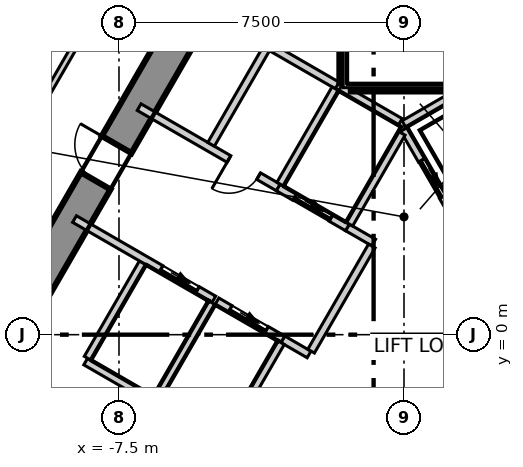
"""IFC4 building model, lengths in metres.
Left out: names, types, materials, properties, quantities, classifications, styles, units other than length and angle.
Written with IfcOpenShell. Run it as: python <this file> out.ifc"""

import sys

from ifc_helpers import new_model, si_unit, direction, frame, frame_2d, origin, place, context, subcontext, project, spatial, polyline, rectangle, outline, extrude, element, fill, save


model = new_model("IFC4")
c1 = context("Model", 3, precision=1e-05, world=origin(), true_north=direction((0.0, 1.0)))
c2 = subcontext(c1, "Body", "Model", "MODEL_VIEW")
j1 = project(units=[si_unit("LENGTHUNIT", "METRE"), si_unit("PLANEANGLEUNIT", "RADIAN")], contexts=[c1])
p1 = place(None, origin())
s1 = spatial("IfcSite", under=j1, at=p1, CompositionType="ELEMENT")
p2 = place(p1, origin())
s2 = spatial("IfcBuilding", under=s1, at=p2, CompositionType="ELEMENT")
p3 = place(p2, frame((0.0, 0.0, 59.3)))
s3 = spatial("IfcBuildingStorey", under=s2, at=p3, CompositionType="ELEMENT", Elevation=59.3)
p4 = place(p3, frame((-1.645, 15.25, -0.3), z_axis=(0.0, 0.0, 1.0), x_axis=(-0.500026485275, -0.866010111964, 0.0)))
e1 = element("IfcWall", 1, at=p4, inside=s3, PredefinedType="SHEAR", context=c2, shape_type="SweptSolid", body=[
    extrude(outline(polyline([(-0.26, -0.45), (1.685, -0.45), (3.63, -0.45), (5.576, -0.45), (7.521, -0.45), (9.466, -0.449), (11.411, -0.449), (13.357, -0.449), (15.302, -0.449), (17.247, -0.449), (19.192, -0.449), (21.138, -0.449), (23.083, -0.449), (25.028, -0.449), (24.509, 0.45), (22.644, 0.45), (20.778, 0.45), (18.913, 0.45), (17.048, 0.45), (15.182, 0.449), (13.317, 0.449), (11.452, 0.449), (9.587, 0.449), (7.721, 0.449), (5.856, 0.449), (3.991, 0.449), (2.125, 0.449), (0.26, 0.449), (-0.26, -0.45)])), origin(), (0.0, 0.0, 1.0), 4.0),
])
p5 = place(p4, frame((11.834, 0.0, 0.3)))
e2 = element("IfcOpeningElement", 2, at=p5, cuts=e1, PredefinedType="OPENING", context=c2, shape_type="SweptSolid", body=[
    extrude(rectangle(XDim=1.1, YDim=2.1, at=frame_2d((0.55, 1.05))), frame((0.0, 0.46, 0.0), z_axis=(0.0, -1.0, 0.0), x_axis=(1.0, 0.0, 0.0)), (0.0, 0.0, 1.0), 0.92),
])
p6 = place(p4, frame((18.976, 0.0, 0.3)))
e3 = element("IfcOpeningElement", 3, at=p6, cuts=e1, PredefinedType="OPENING", context=c2, shape_type="SweptSolid", body=[
    extrude(rectangle(XDim=0.9, YDim=2.1, at=frame_2d((0.45, 1.05))), frame((0.0, 0.46, 0.0), z_axis=(0.0, -1.0, 0.0), x_axis=(1.0, 0.0, 0.0)), (0.0, 0.0, 1.0), 0.92),
])
p7 = place(p4, frame((4.892, 0.0, 0.3)))
e4 = element("IfcOpeningElement", 4, at=p7, cuts=e1, PredefinedType="OPENING", context=c2, shape_type="SweptSolid", body=[
    extrude(rectangle(XDim=0.9, YDim=2.1, at=frame_2d((0.45, 1.05))), frame((0.0, 0.46, 0.0), z_axis=(0.0, -1.0, 0.0), x_axis=(1.0, 0.0, 0.0)), (0.0, 0.0, 1.0), 0.92),
])
p8 = place(p3, frame((-3.371, 37.591, 0.0), z_axis=(0.0, 0.0, 1.0), x_axis=(-0.500006313899, -0.866021758423, 0.0)))
e5 = element("IfcWall", 5, at=p8, inside=s3, PredefinedType="ELEMENTEDWALL", context=c2, shape_type="SweptSolid", body=[
    extrude(rectangle(XDim=61.719, YDim=0.2, at=frame_2d((30.859, 0.0))), origin(), (0.0, 0.0, 1.0), 3.7),
])
p9 = place(p8, frame((2.198, 0.0, 0.9)))
e6 = element("IfcOpeningElement", 6, at=p9, cuts=e5, PredefinedType="OPENING", context=c2, shape_type="SweptSolid", body=[
    extrude(rectangle(XDim=5.6, YDim=2.5, at=frame_2d((2.8, 1.25))), frame((0.0, 0.11, 0.0), z_axis=(0.0, -1.0, 0.0), x_axis=(1.0, 0.0, 0.0)), (0.0, 0.0, 1.0), 0.22),
])
p10 = place(p8, frame((9.59, 0.0, 0.9)))
e7 = element("IfcOpeningElement", 7, at=p10, cuts=e5, PredefinedType="OPENING", context=c2, shape_type="SweptSolid", body=[
    extrude(rectangle(XDim=5.6, YDim=2.5, at=frame_2d((2.8, 1.25))), frame((0.0, 0.11, 0.0), z_axis=(0.0, -1.0, 0.0), x_axis=(1.0, 0.0, 0.0)), (0.0, 0.0, 1.0), 0.22),
])
p11 = place(p8, frame((16.982, 0.0, 0.9)))
e8 = element("IfcOpeningElement", 8, at=p11, cuts=e5, PredefinedType="OPENING", context=c2, shape_type="SweptSolid", body=[
    extrude(rectangle(XDim=5.6, YDim=2.5, at=frame_2d((2.8, 1.25))), frame((0.0, 0.11, 0.0), z_axis=(0.0, -1.0, 0.0), x_axis=(1.0, 0.0, 0.0)), (0.0, 0.0, 1.0), 0.22),
])
p12 = place(p8, frame((24.373, 0.0, 0.9)))
e9 = element("IfcOpeningElement", 9, at=p12, cuts=e5, PredefinedType="OPENING", context=c2, shape_type="SweptSolid", body=[
    extrude(rectangle(XDim=5.6, YDim=2.5, at=frame_2d((2.8, 1.25))), frame((0.0, 0.11, 0.0), z_axis=(0.0, -1.0, 0.0), x_axis=(1.0, 0.0, 0.0)), (0.0, 0.0, 1.0), 0.22),
])
p13 = place(p8, frame((31.765, 0.0, 0.9)))
e10 = element("IfcOpeningElement", 10, at=p13, cuts=e5, PredefinedType="OPENING", context=c2, shape_type="SweptSolid", body=[
    extrude(rectangle(XDim=5.6, YDim=2.5, at=frame_2d((2.8, 1.25))), frame((0.0, 0.11, 0.0), z_axis=(0.0, -1.0, 0.0), x_axis=(1.0, 0.0, 0.0)), (0.0, 0.0, 1.0), 0.22),
])
p14 = place(p8, frame((39.157, 0.0, 0.9)))
e11 = element("IfcOpeningElement", 11, at=p14, cuts=e5, PredefinedType="OPENING", context=c2, shape_type="SweptSolid", body=[
    extrude(rectangle(XDim=5.6, YDim=2.5, at=frame_2d((2.8, 1.25))), frame((0.0, 0.11, 0.0), z_axis=(0.0, -1.0, 0.0), x_axis=(1.0, 0.0, 0.0)), (0.0, 0.0, 1.0), 0.22),
])
p15 = place(p8, frame((46.548, 0.0, 0.9)))
e12 = element("IfcOpeningElement", 12, at=p15, cuts=e5, PredefinedType="OPENING", context=c2, shape_type="SweptSolid", body=[
    extrude(rectangle(XDim=5.6, YDim=2.5, at=frame_2d((2.8, 1.25))), frame((0.0, 0.11, 0.0), z_axis=(0.0, -1.0, 0.0), x_axis=(1.0, 0.0, 0.0)), (0.0, 0.0, 1.0), 0.22),
])
p16 = place(p8, frame((53.94, 0.0, 0.9)))
e13 = element("IfcOpeningElement", 13, at=p16, cuts=e5, PredefinedType="OPENING", context=c2, shape_type="SweptSolid", body=[
    extrude(rectangle(XDim=5.6, YDim=2.5, at=frame_2d((2.8, 1.25))), frame((0.0, 0.11, 0.0), z_axis=(0.0, -1.0, 0.0), x_axis=(1.0, 0.0, 0.0)), (0.0, 0.0, 1.0), 0.22),
])
p17 = place(p3, frame((-19.497, -11.17, 0.0), z_axis=(0.0, 0.0, 1.0), x_axis=(0.499998854553, 0.866026065108, 0.0)))
e14 = element("IfcWall", 14, at=p17, inside=s3, PredefinedType="PARTITIONING", context=c2, shape_type="SweptSolid", body=[
    extrude(rectangle(XDim=38.994, YDim=0.15, at=frame_2d((19.497, 0.0))), origin(), (0.0, 0.0, 1.0), 3.7),
])
p18 = place(p17, frame((36.044, 0.0, 0.0)))
e15 = element("IfcOpeningElement", 15, at=p18, cuts=e14, PredefinedType="OPENING", context=c2, shape_type="SweptSolid", body=[
    extrude(rectangle(XDim=1.1, YDim=2.1, at=frame_2d((0.55, 1.05))), frame((0.0, 0.085, 0.0), z_axis=(0.0, -1.0, 0.0), x_axis=(1.0, 0.0, 0.0)), (0.0, 0.0, 1.0), 0.17),
])
p19 = place(p17, frame((21.855, 0.0, 0.0)))
e16 = element("IfcOpeningElement", 16, at=p19, cuts=e14, PredefinedType="OPENING", context=c2, shape_type="SweptSolid", body=[
    extrude(rectangle(XDim=1.1, YDim=2.1, at=frame_2d((0.55, 1.05))), frame((0.0, 0.085, 0.0), z_axis=(0.0, -1.0, 0.0), x_axis=(1.0, 0.0, 0.0)), (0.0, 0.0, 1.0), 0.17),
])
p20 = place(p17, frame((32.155, 0.0, 0.0)))
e17 = element("IfcOpeningElement", 17, at=p20, cuts=e14, PredefinedType="OPENING", context=c2, shape_type="SweptSolid", body=[
    extrude(rectangle(XDim=0.9, YDim=2.1, at=frame_2d((0.45, 1.05))), frame((0.0, 0.085, 0.0), z_axis=(0.0, -1.0, 0.0), x_axis=(1.0, 0.0, 0.0)), (0.0, 0.0, 1.0), 0.17),
])
p21 = place(p17, frame((28.955, 0.0, 0.0)))
e18 = element("IfcOpeningElement", 18, at=p21, cuts=e14, PredefinedType="OPENING", context=c2, shape_type="SweptSolid", body=[
    extrude(rectangle(XDim=0.9, YDim=2.1, at=frame_2d((0.45, 1.05))), frame((0.0, 0.085, 0.0), z_axis=(0.0, -1.0, 0.0), x_axis=(1.0, 0.0, 0.0)), (0.0, 0.0, 1.0), 0.17),
])
p22 = place(p17, frame((26.055, 0.0, 0.0)))
e19 = element("IfcOpeningElement", 19, at=p22, cuts=e14, PredefinedType="OPENING", context=c2, shape_type="SweptSolid", body=[
    extrude(rectangle(XDim=1.0, YDim=2.1, at=frame_2d((0.5, 1.05))), frame((0.0, 0.085, 0.0), z_axis=(0.0, -1.0, 0.0), x_axis=(1.0, 0.0, 0.0)), (0.0, 0.0, 1.0), 0.17),
])
p23 = place(p17, frame((10.373, 0.0, 0.0)))
e20 = element("IfcOpeningElement", 20, at=p23, cuts=e14, PredefinedType="OPENING", context=c2, shape_type="SweptSolid", body=[
    extrude(rectangle(XDim=1.0, YDim=2.1, at=frame_2d((0.5, 1.05))), frame((0.0, 0.085, 0.0), z_axis=(0.0, -1.0, 0.0), x_axis=(1.0, 0.0, 0.0)), (0.0, 0.0, 1.0), 0.17),
])
p24 = place(p17, frame((17.773, 0.0, 0.0)))
e21 = element("IfcOpeningElement", 21, at=p24, cuts=e14, PredefinedType="OPENING", context=c2, shape_type="SweptSolid", body=[
    extrude(rectangle(XDim=0.9, YDim=2.1, at=frame_2d((0.45, 1.05))), frame((0.0, 0.085, 0.0), z_axis=(0.0, -1.0, 0.0), x_axis=(1.0, 0.0, 0.0)), (0.0, 0.0, 1.0), 0.17),
])
p25 = place(p17, frame((1.689, 0.0, 0.0)))
e22 = element("IfcOpeningElement", 22, at=p25, cuts=e14, PredefinedType="OPENING", context=c2, shape_type="SweptSolid", body=[
    extrude(rectangle(XDim=1.1, YDim=2.1, at=frame_2d((0.55, 1.05))), frame((0.0, 0.085, 0.0), z_axis=(0.0, -1.0, 0.0), x_axis=(1.0, 0.0, 0.0)), (0.0, 0.0, 1.0), 0.17),
])
p26 = place(p3, frame((0.075, 22.47, 0.0), z_axis=(0.0, 0.0, 1.0), x_axis=(0.500002280369, -0.866024087209, 0.0)))
e23 = element("IfcWall", 23, at=p26, inside=s3, PredefinedType="PARTITIONING", context=c2, shape_type="SweptSolid", body=[
    extrude(rectangle(XDim=38.844, YDim=0.15, at=frame_2d((19.422, 0.0))), origin(), (0.0, 0.0, 1.0), 3.7),
])
p27 = place(p26, frame((36.044, 0.0, 0.0)))
e24 = element("IfcOpeningElement", 24, at=p27, cuts=e23, PredefinedType="OPENING", context=c2, shape_type="SweptSolid", body=[
    extrude(rectangle(XDim=1.1, YDim=2.1, at=frame_2d((0.55, 1.05))), frame((0.0, 0.085, 0.0), z_axis=(0.0, -1.0, 0.0), x_axis=(1.0, 0.0, 0.0)), (0.0, 0.0, 1.0), 0.17),
])
p28 = place(p26, frame((26.255, 0.0, 0.0)))
e25 = element("IfcOpeningElement", 25, at=p28, cuts=e23, PredefinedType="OPENING", context=c2, shape_type="SweptSolid", body=[
    extrude(rectangle(XDim=1.1, YDim=2.1, at=frame_2d((0.55, 1.05))), frame((0.0, 0.085, 0.0), z_axis=(0.0, -1.0, 0.0), x_axis=(1.0, 0.0, 0.0)), (0.0, 0.0, 1.0), 0.17),
])
p29 = place(p26, frame((9.173, 0.0, 0.0)))
e26 = element("IfcOpeningElement", 26, at=p29, cuts=e23, PredefinedType="OPENING", context=c2, shape_type="SweptSolid", body=[
    extrude(rectangle(XDim=1.1, YDim=2.1, at=frame_2d((0.55, 1.05))), frame((0.0, 0.085, 0.0), z_axis=(0.0, -1.0, 0.0), x_axis=(1.0, 0.0, 0.0)), (0.0, 0.0, 1.0), 0.17),
])
p30 = place(p26, frame((17.373, 0.0, 0.0)))
e27 = element("IfcOpeningElement", 27, at=p30, cuts=e23, PredefinedType="OPENING", context=c2, shape_type="SweptSolid", body=[
    extrude(rectangle(XDim=0.9, YDim=2.1, at=frame_2d((0.45, 1.05))), frame((0.0, 0.085, 0.0), z_axis=(0.0, -1.0, 0.0), x_axis=(1.0, 0.0, 0.0)), (0.0, 0.0, 1.0), 0.17),
])
p31 = place(p26, frame((14.173, 0.0, 0.0)))
e28 = element("IfcOpeningElement", 28, at=p31, cuts=e23, PredefinedType="OPENING", context=c2, shape_type="SweptSolid", body=[
    extrude(rectangle(XDim=0.9, YDim=2.1, at=frame_2d((0.45, 1.05))), frame((0.0, 0.085, 0.0), z_axis=(0.0, -1.0, 0.0), x_axis=(1.0, 0.0, 0.0)), (0.0, 0.0, 1.0), 0.17),
])
p32 = place(p26, frame((11.273, 0.0, 0.0)))
e29 = element("IfcOpeningElement", 29, at=p32, cuts=e23, PredefinedType="OPENING", context=c2, shape_type="SweptSolid", body=[
    extrude(rectangle(XDim=1.0, YDim=2.1, at=frame_2d((0.5, 1.05))), frame((0.0, 0.085, 0.0), z_axis=(0.0, -1.0, 0.0), x_axis=(1.0, 0.0, 0.0)), (0.0, 0.0, 1.0), 0.17),
])
p33 = place(p26, frame((1.689, 0.0, 0.0)))
e30 = element("IfcOpeningElement", 30, at=p33, cuts=e23, PredefinedType="OPENING", context=c2, shape_type="SweptSolid", body=[
    extrude(rectangle(XDim=1.1, YDim=2.1, at=frame_2d((0.55, 1.05))), frame((0.0, 0.085, 0.0), z_axis=(0.0, -1.0, 0.0), x_axis=(1.0, 0.0, 0.0)), (0.0, 0.0, 1.0), 0.17),
])
p34 = place(p3, frame((-8.376, -0.707, 0.0), z_axis=(0.0, 0.0, 1.0), x_axis=(0.866067520717, -0.499927044236, 0.0)))
e31 = element("IfcWall", 31, at=p34, inside=s3, PredefinedType="SOLIDWALL", context=c2, shape_type="SweptSolid", body=[
    extrude(rectangle(XDim=2.1, YDim=0.2, at=frame_2d((1.05, 0.0))), origin(), (0.0, 0.0, 1.0), 3.7),
])
p35 = place(p3, frame((-8.326, -0.62, 0.0), z_axis=(0.0, 0.0, 1.0), x_axis=(0.500023687443, 0.866011727401, 0.0)))
e32 = element("IfcWall", 32, at=p35, inside=s3, PredefinedType="SOLIDWALL", context=c2, shape_type="SweptSolid", body=[
    extrude(rectangle(XDim=2.9, YDim=0.2, at=frame_2d((1.45, 0.0))), origin(), (0.0, 0.0, 1.0), 3.7),
])
p36 = place(p3, frame((-0.002, 5.541, 0.0), z_axis=(0.0, 0.0, 1.0), x_axis=(0.86600155993, 0.500041296494, 0.0)))
e33 = element("IfcWall", 33, at=p36, inside=s3, PredefinedType="SOLIDWALL", context=c2, shape_type="SweptSolid", body=[
    extrude(rectangle(XDim=4.132, YDim=0.2, at=frame_2d((2.066, 0.0))), origin(), (0.0, 0.0, 1.0), 3.7),
])
p37 = place(p3, frame((0.0, 5.4, 0.0), z_axis=(0.0, 0.0, 1.0), x_axis=(0.500103862429, -0.865965430478, 0.0)))
e34 = element("IfcWall", 34, at=p37, inside=s3, PredefinedType="SOLIDWALL", context=c2, shape_type="SweptSolid", body=[
    extrude(rectangle(XDim=2.973, YDim=0.2, at=frame_2d((1.487, 0.0))), origin(), (0.0, 0.0, 1.0), 3.7),
])
p38 = place(p37, frame((0.937, 0.0, 0.0)))
e35 = element("IfcOpeningElement", 35, at=p38, cuts=e34, PredefinedType="OPENING", context=c2, shape_type="SweptSolid", body=[
    extrude(rectangle(XDim=1.1, YDim=2.1, at=frame_2d((0.55, 1.05))), frame((0.0, 0.11, 0.0), z_axis=(0.0, -1.0, 0.0), x_axis=(1.0, 0.0, 0.0)), (0.0, 0.0, 1.0), 0.22),
])
p39 = place(p3, frame((-8.67, 3.043, 0.0), z_axis=(0.0, 0.0, 1.0), x_axis=(0.866029956157, -0.499992114976, 0.0)))
e36 = element("IfcWall", 36, at=p39, inside=s3, PredefinedType="SOLIDWALL", context=c2, shape_type="SweptSolid", body=[
    extrude(rectangle(XDim=4.232, YDim=0.2, at=frame_2d((2.116, 0.0))), origin(), (0.0, 0.0, 1.0), 3.7),
])
p40 = place(p39, frame((2.63, 0.0, 0.0)))
e37 = element("IfcOpeningElement", 37, at=p40, cuts=e36, PredefinedType="OPENING", context=c2, shape_type="SweptSolid", body=[
    extrude(rectangle(XDim=1.1, YDim=2.1, at=frame_2d((0.55, 1.05))), frame((0.0, 0.11, 0.0), z_axis=(0.0, -1.0, 0.0), x_axis=(1.0, 0.0, 0.0)), (0.0, 0.0, 1.0), 0.22),
])
p41 = place(p3, frame((-3.188, -0.122, 0.0), z_axis=(0.0, 0.0, 1.0), x_axis=(0.865705793592, -0.50055317294, 0.0)))
e38 = element("IfcWall", 38, at=p41, inside=s3, PredefinedType="SOLIDWALL", context=c2, shape_type="SweptSolid", body=[
    extrude(rectangle(XDim=0.797, YDim=0.2, at=frame_2d((0.398, 0.0))), origin(), (0.0, 0.0, 1.0), 3.7),
])
p42 = place(p3, frame((-6.97, 5.987, 0.0), z_axis=(0.0, 0.0, 1.0), x_axis=(0.866029956157, -0.499992114976, 0.0)))
e39 = element("IfcWall", 39, at=p42, inside=s3, PredefinedType="SOLIDWALL", context=c2, shape_type="SweptSolid", body=[
    extrude(rectangle(XDim=4.232, YDim=0.2, at=frame_2d((2.116, 0.0))), origin(), (0.0, 0.0, 1.0), 3.7),
])
p43 = place(p42, frame((2.73, 0.0, 0.0)))
e40 = element("IfcOpeningElement", 40, at=p43, cuts=e39, PredefinedType="OPENING", context=c2, shape_type="SweptSolid", body=[
    extrude(rectangle(XDim=0.9, YDim=2.1, at=frame_2d((0.45, 1.05))), frame((0.0, 0.11, 0.0), z_axis=(0.0, -1.0, 0.0), x_axis=(1.0, 0.0, 0.0)), (0.0, 0.0, 1.0), 0.22),
])
p44 = place(p3, frame((-1.488, 2.822, 0.0), z_axis=(0.0, 0.0, 1.0), x_axis=(0.866236612152, -0.499633997809, 0.0)))
e41 = element("IfcWall", 41, at=p44, inside=s3, PredefinedType="SOLIDWALL", context=c2, shape_type="SweptSolid", body=[
    extrude(rectangle(XDim=0.796, YDim=0.2, at=frame_2d((0.398, 0.0))), origin(), (0.0, 0.0, 1.0), 3.7),
])
p45 = place(p3, frame((-5.076, 5.009, 0.0), z_axis=(0.0, 0.0, 1.0), x_axis=(0.50002537861, 0.866010750942, 0.0)))
e42 = element("IfcWall", 42, at=p45, inside=s3, PredefinedType="SOLIDWALL", context=c2, shape_type="SweptSolid", body=[
    extrude(rectangle(XDim=3.0, YDim=0.2, at=frame_2d((1.5, 0.0))), origin(), (0.0, 0.0, 1.0), 3.7),
])
p46 = place(p3, frame((-3.489, 7.557, 0.0), z_axis=(0.0, 0.0, 1.0), x_axis=(0.866010750942, -0.50002537861, 0.0)))
e43 = element("IfcWall", 43, at=p46, inside=s3, PredefinedType="SOLIDWALL", context=c2, shape_type="SweptSolid", body=[
    extrude(rectangle(XDim=2.0, YDim=0.2, at=frame_2d((1.0, 0.0))), origin(), (0.0, 0.0, 1.0), 3.7),
])
p47 = place(p3, frame((-2.444, -0.433, 0.0), z_axis=(0.0, 0.0, 1.0), x_axis=(0.500035624827, 0.866004834804, 0.0)))
e44 = element("IfcWall", 44, at=p47, inside=s3, PredefinedType="SOLIDWALL", context=c2, shape_type="SweptSolid", body=[
    extrude(rectangle(XDim=3.194, YDim=0.2, at=frame_2d((1.597, 0.0))), origin(), (0.0, 0.0, 1.0), 3.7),
])
p48 = place(p3, frame((-6.507, -1.67, 0.0), z_axis=(0.0, 0.0, 1.0), x_axis=(0.50012328804, 0.865954211699, 0.0)))
e45 = element("IfcWall", 45, at=p48, inside=s3, PredefinedType="SOLIDWALL", context=c2, shape_type="SweptSolid", body=[
    extrude(rectangle(XDim=2.9, YDim=0.2, at=frame_2d((1.45, 0.0))), origin(), (0.0, 0.0, 1.0), 3.7),
])
p49 = place(p3, frame((-4.922, 0.879, 0.0), z_axis=(0.0, 0.0, 1.0), x_axis=(0.866073918653, -0.499915960366, 0.0)))
e46 = element("IfcWall", 46, at=p49, inside=s3, PredefinedType="SOLIDWALL", context=c2, shape_type="SweptSolid", body=[
    extrude(rectangle(XDim=2.002, YDim=0.2, at=frame_2d((1.001, 0.0))), origin(), (0.0, 0.0, 1.0), 3.7),
])
p50 = place(p49, frame((0.402, 0.0, 0.0)))
e47 = element("IfcOpeningElement", 47, at=p50, cuts=e46, PredefinedType="OPENING", context=c2, shape_type="SweptSolid", body=[
    extrude(rectangle(XDim=1.1, YDim=2.1, at=frame_2d((0.55, 1.05))), frame((0.0, 0.11, 0.0), z_axis=(0.0, -1.0, 0.0), x_axis=(1.0, 0.0, 0.0)), (0.0, 0.0, 1.0), 0.22),
])
p51 = place(p3, frame((-4.619, -2.6, 0.0), z_axis=(0.0, 0.0, 1.0), x_axis=(0.50009492287, 0.865970593103, 0.0)))
e48 = element("IfcWall", 48, at=p51, inside=s3, PredefinedType="SOLIDWALL", context=c2, shape_type="SweptSolid", body=[
    extrude(rectangle(XDim=2.761, YDim=0.2, at=frame_2d((1.381, 0.0))), origin(), (0.0, 0.0, 1.0), 3.7),
])
p52 = place(p3, frame((-3.309, 3.873, 0.0), z_axis=(0.0, 0.0, 1.0), x_axis=(0.866098583652, -0.499873227325, 0.0)))
e49 = element("IfcWall", 49, at=p52, inside=s3, PredefinedType="SOLIDWALL", context=c2, shape_type="SweptSolid", body=[
    extrude(rectangle(XDim=2.103, YDim=0.2, at=frame_2d((1.051, 0.0))), origin(), (0.0, 0.0, 1.0), 3.7),
])
p53 = place(p52, frame((0.502, 0.0, 0.0)))
e50 = element("IfcOpeningElement", 50, at=p53, cuts=e49, PredefinedType="OPENING", context=c2, shape_type="SweptSolid", body=[
    extrude(rectangle(XDim=1.1, YDim=2.1, at=frame_2d((0.55, 1.05))), frame((0.0, 0.11, 0.0), z_axis=(0.0, -1.0, 0.0), x_axis=(1.0, 0.0, 0.0)), (0.0, 0.0, 1.0), 0.22),
])
p54 = place(p3, frame((-3.257, 3.959, 0.0), z_axis=(0.0, 0.0, 1.0), x_axis=(0.50012328804, 0.865954211699, 0.0)))
e51 = element("IfcWall", 51, at=p54, inside=s3, PredefinedType="SOLIDWALL", context=c2, shape_type="SweptSolid", body=[
    extrude(rectangle(XDim=2.9, YDim=0.2, at=frame_2d((1.45, 0.0))), origin(), (0.0, 0.0, 1.0), 3.7),
])
p55 = place(p3, frame((-1.67, 6.507, 0.0), z_axis=(0.0, 0.0, 1.0), x_axis=(0.865941441609, -0.500145398563, 0.0)))
e52 = element("IfcWall", 52, at=p55, inside=s3, PredefinedType="SOLIDWALL", context=c2, shape_type="SweptSolid", body=[
    extrude(rectangle(XDim=1.815, YDim=0.2, at=frame_2d((0.908, 0.0))), origin(), (0.0, 0.0, 1.0), 3.7),
])
p56 = place(p3, frame((-1.438, 2.909, 0.0), z_axis=(0.0, 0.0, 1.0), x_axis=(0.499829630636, 0.866123744241, 0.0)))
e53 = element("IfcWall", 53, at=p56, inside=s3, PredefinedType="SOLIDWALL", context=c2, shape_type="SweptSolid", body=[
    extrude(rectangle(XDim=2.761, YDim=0.2, at=frame_2d((1.38, 0.0))), origin(), (0.0, 0.0, 1.0), 3.7),
])
p57 = place(p3, frame((-1.4, 6.5, 0.0), z_axis=(0.0, 0.0, 1.0), x_axis=(1.0, 0.0, 0.0)))
e54 = element("IfcWall", 54, at=p57, inside=s3, PredefinedType="SOLIDWALL", context=c2, shape_type="SweptSolid", body=[
    extrude(rectangle(XDim=2.8, YDim=0.2, at=frame_2d((1.4, 0.0))), origin(), (0.0, 0.0, 1.0), 3.7),
])
p58 = place(p3, frame((-1.6, 6.615, 0.0), z_axis=(0.0, 0.0, 1.0), x_axis=(0.0, 1.0, 0.0)))
e55 = element("IfcWall", 55, at=p58, inside=s3, PredefinedType="SOLIDWALL", context=c2, shape_type="SweptSolid", body=[
    extrude(rectangle(XDim=8.615, YDim=0.2, at=frame_2d((4.308, 0.0))), origin(), (0.0, 0.0, 1.0), 3.7),
])
p59 = place(p38, origin())
e56 = element("IfcDoor", 56, at=p59, inside=s3, OperationType="SLIDING_TO_LEFT", PredefinedType="DOOR", context=c2, shape_type="SweptSolid", body=[
    extrude(rectangle(XDim=1.1, YDim=2.1, at=frame_2d((0.55, 1.05))), frame((0.0, 0.025, 0.0), z_axis=(0.0, -1.0, 0.0), x_axis=(1.0, 0.0, 0.0)), (0.0, 0.0, 1.0), 0.05),
])
fill(e35, e56)
p60 = place(p50, origin())
e57 = element("IfcDoor", 57, at=p60, inside=s3, OperationType="SLIDING_TO_LEFT", PredefinedType="DOOR", context=c2, shape_type="SweptSolid", body=[
    extrude(rectangle(XDim=1.1, YDim=2.1, at=frame_2d((0.55, 1.05))), frame((0.0, 0.025, 0.0), z_axis=(0.0, -1.0, 0.0), x_axis=(1.0, 0.0, 0.0)), (0.0, 0.0, 1.0), 0.05),
])
fill(e47, e57)
p61 = place(p53, origin())
e58 = element("IfcDoor", 58, at=p61, inside=s3, OperationType="SLIDING_TO_LEFT", PredefinedType="DOOR", context=c2, shape_type="SweptSolid", body=[
    extrude(rectangle(XDim=1.1, YDim=2.1, at=frame_2d((0.55, 1.05))), frame((0.0, 0.025, 0.0), z_axis=(0.0, -1.0, 0.0), x_axis=(1.0, 0.0, 0.0)), (0.0, 0.0, 1.0), 0.05),
])
fill(e50, e58)
p62 = place(p40, origin())
e59 = element("IfcDoor", 59, at=p62, inside=s3, OperationType="SLIDING_TO_LEFT", PredefinedType="DOOR", context=c2, shape_type="SweptSolid", body=[
    extrude(rectangle(XDim=1.1, YDim=2.1, at=frame_2d((0.55, 1.05))), frame((0.0, 0.025, 0.0), z_axis=(0.0, -1.0, 0.0), x_axis=(1.0, 0.0, 0.0)), (0.0, 0.0, 1.0), 0.05),
])
fill(e37, e59)
p63 = place(p43, origin())
e60 = element("IfcDoor", 60, at=p63, inside=s3, OperationType="SINGLE_SWING_LEFT", PredefinedType="DOOR", context=c2, shape_type="SweptSolid", body=[
    extrude(rectangle(XDim=0.9, YDim=2.1, at=frame_2d((0.45, 1.05))), frame((0.0, 0.025, 0.0), z_axis=(0.0, -1.0, 0.0), x_axis=(1.0, 0.0, 0.0)), (0.0, 0.0, 1.0), 0.05),
])
fill(e40, e60)
p64 = place(p5, origin())
e61 = element("IfcDoor", 61, at=p64, inside=s3, OperationType="SINGLE_SWING_LEFT", PredefinedType="DOOR", context=c2, shape_type="SweptSolid", body=[
    extrude(rectangle(XDim=1.1, YDim=2.1, at=frame_2d((0.55, 1.05))), frame((0.0, 0.025, 0.0), z_axis=(0.0, -1.0, 0.0), x_axis=(1.0, 0.0, 0.0)), (0.0, 0.0, 1.0), 0.05),
])
fill(e2, e61)
save(model, sys.argv[1])
